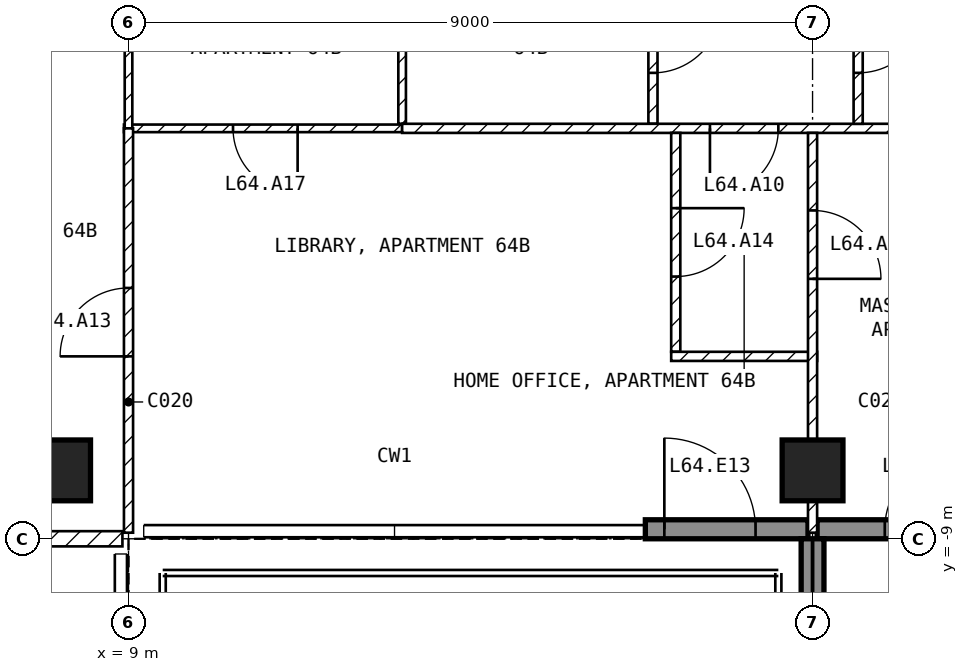
"""IFC4 building model, lengths in metres.
Left out: names, types, materials, properties, quantities, classifications, styles, units other than length and angle.
Written with IfcOpenShell. Run it as: python <this file> out.ifc"""

import sys

from ifc_helpers import new_model, si_unit, direction, frame, frame_2d, origin, origin_2d, place, context, subcontext, project, spatial, rectangle, extrude, element, fill, save


model = new_model("IFC4")
c1 = context("Model", 3, precision=1e-05, world=origin(), true_north=direction((0.0, 1.0)))
c2 = subcontext(c1, "Body", "Model", "MODEL_VIEW")
j1 = project(units=[si_unit("LENGTHUNIT", "METRE"), si_unit("PLANEANGLEUNIT", "RADIAN")], contexts=[c1])
p1 = place(None, origin())
s1 = spatial("IfcSite", under=j1, at=p1, CompositionType="ELEMENT")
p2 = place(p1, origin())
s2 = spatial("IfcBuilding", under=s1, at=p2, CompositionType="ELEMENT")
p3 = place(p2, frame((0.0, 0.0, 253.5)))
s3 = spatial("IfcBuildingStorey", under=s2, at=p3, CompositionType="ELEMENT", Elevation=253.5)
for number, where, z_axis, x_axis in (
    (1, (8.1, -8.1, -0.25), (0.0, 0.0, 1.0), (1.0, 0.0, 0.0)),
    (2, (18.0, -8.1, -0.25), (0.0, 0.0, 1.0), (1.0, 0.0, 0.0)),
):
    element("IfcColumn", number, at=place(p3, frame(where, z_axis=z_axis, x_axis=x_axis)), inside=s3, PredefinedType="COLUMN", context=c2, shape_type="SweptSolid", body=[
        extrude(rectangle(XDim=0.8, YDim=0.8, at=origin_2d()), origin(), (0.0, 0.0, 1.0), 3.5),
    ])
p4 = place(p3, frame((15.8, -8.875, 0.0), z_axis=(0.0, 0.0, 1.0), x_axis=(1.0, 0.0, 0.0)))
e3 = element("IfcWall", 3, at=p4, inside=s3, PredefinedType="SOLIDWALL", context=c2, shape_type="SweptSolid", body=[
    extrude(rectangle(XDim=2.14, YDim=0.25, at=frame_2d((1.07, 0.0))), origin(), (0.0, 0.0, 1.0), 3.25),
])
p5 = place(p4, frame((0.25, 0.0, 0.0)))
e4 = element("IfcOpeningElement", 4, at=p5, cuts=e3, PredefinedType="OPENING", context=c2, shape_type="SweptSolid", body=[
    extrude(rectangle(XDim=1.2, YDim=2.4, at=frame_2d((0.6, 1.2))), frame((0.0, 0.135, 0.0), z_axis=(0.0, -1.0, 0.0), x_axis=(1.0, 0.0, 0.0)), (0.0, 0.0, 1.0), 0.27),
])
p6 = place(p3, frame((18.06, -8.875, 0.0), z_axis=(0.0, 0.0, 1.0), x_axis=(1.0, 0.0, 0.0)))
e5 = element("IfcWall", 5, at=p6, inside=s3, PredefinedType="SOLIDWALL", context=c2, shape_type="SweptSolid", body=[
    extrude(rectangle(XDim=3.04, YDim=0.25, at=frame_2d((1.52, 0.0))), origin(), (0.0, 0.0, 1.0), 3.25),
])
p7 = place(p6, frame((0.89, 0.0, 0.0)))
e6 = element("IfcOpeningElement", 6, at=p7, cuts=e5, PredefinedType="OPENING", context=c2, shape_type="SweptSolid", body=[
    extrude(rectangle(XDim=1.0, YDim=2.4, at=frame_2d((0.5, 1.2))), frame((0.0, 0.135, 0.0), z_axis=(0.0, -1.0, 0.0), x_axis=(1.0, 0.0, 0.0)), (0.0, 0.0, 1.0), 0.27),
])
p8 = place(p3, frame((18.0, -9.0, 0.0), z_axis=(0.0, 0.0, 1.0), x_axis=(0.0, -1.0, 0.0)))
e7 = element("IfcWall", 7, at=p8, inside=s3, PredefinedType="SOLIDWALL", context=c2, shape_type="SweptSolid", body=[
    extrude(rectangle(XDim=2.74, YDim=0.3, at=frame_2d((1.37, 0.0))), origin(), (0.0, 0.0, 1.0), 3.25),
])
p9 = place(p3, frame((8.92, -9.0, 0.0), z_axis=(0.0, 0.0, 1.0), x_axis=(-1.0, 0.0, 0.0)))
e8 = element("IfcWall", 8, at=p9, inside=s3, PredefinedType="PARTITIONING", context=c2, shape_type="SweptSolid", body=[
    extrude(rectangle(XDim=17.84, YDim=0.2, at=frame_2d((8.92, 0.0))), origin(), (0.0, 0.0, 1.0), 3.25),
])
p10 = place(p9, frame((8.42, 0.0, 0.0)))
e9 = element("IfcOpeningElement", 9, at=p10, cuts=e8, PredefinedType="OPENING", context=c2, shape_type="SweptSolid", body=[
    extrude(rectangle(XDim=1.0, YDim=2.1, at=frame_2d((0.5, 1.05))), frame((0.0, 0.11, 0.0), z_axis=(0.0, -1.0, 0.0), x_axis=(1.0, 0.0, 0.0)), (0.0, 0.0, 1.0), 0.22),
])
p11 = place(p3, frame((12.6, -1.3, 0.0), z_axis=(0.0, 0.0, 1.0), x_axis=(0.0, -1.0, 0.0)))
e10 = element("IfcWall", 10, at=p11, inside=s3, PredefinedType="PARTITIONING", context=c2, shape_type="SweptSolid", body=[
    extrude(rectangle(XDim=2.24, YDim=0.1, at=frame_2d((1.12, 0.0))), origin(), (0.0, 0.0, 1.0), 3.25),
])
p12 = place(p3, frame((12.6, -3.6, 0.0), z_axis=(0.0, 0.0, 1.0), x_axis=(-1.0, 0.0, 0.0)))
e11 = element("IfcWall", 11, at=p12, inside=s3, PredefinedType="PARTITIONING", context=c2, shape_type="SweptSolid", body=[
    extrude(rectangle(XDim=3.66, YDim=0.1, at=frame_2d((1.83, 0.0))), origin(), (0.0, 0.0, 1.0), 3.25),
])
p13 = place(p12, frame((1.375, 0.0, 0.0)))
e12 = element("IfcOpeningElement", 12, at=p13, cuts=e11, PredefinedType="OPENING", context=c2, shape_type="SweptSolid", body=[
    extrude(rectangle(XDim=0.85, YDim=2.1, at=frame_2d((0.425, 1.05))), frame((0.0, 0.06, 0.0), z_axis=(0.0, -1.0, 0.0), x_axis=(1.0, 0.0, 0.0)), (0.0, 0.0, 1.0), 0.12),
])
p14 = place(p3, frame((9.0, -3.6, 0.0), z_axis=(0.0, 0.0, 1.0), x_axis=(0.0, 1.0, 0.0)))
e13 = element("IfcWall", 13, at=p14, inside=s3, PredefinedType="PARTITIONING", context=c2, shape_type="SweptSolid", body=[
    extrude(rectangle(XDim=2.3, YDim=0.1, at=frame_2d((1.15, 0.0))), origin(), (0.0, 0.0, 1.0), 3.25),
])
p15 = place(p3, frame((15.9, -1.3, 0.0), z_axis=(0.0, 0.0, 1.0), x_axis=(0.0, -1.0, 0.0)))
e14 = element("IfcWall", 14, at=p15, inside=s3, PredefinedType="PARTITIONING", context=c2, shape_type="SweptSolid", body=[
    extrude(rectangle(XDim=2.24, YDim=0.12, at=frame_2d((1.12, 0.0))), origin(), (0.0, 0.0, 1.0), 3.25),
])
p16 = place(p15, frame((0.67, 0.0, 0.0)))
e15 = element("IfcOpeningElement", 15, at=p16, cuts=e14, PredefinedType="OPENING", context=c2, shape_type="SweptSolid", body=[
    extrude(rectangle(XDim=0.9, YDim=2.1, at=frame_2d((0.45, 1.05))), frame((0.0, 0.07, 0.0), z_axis=(0.0, -1.0, 0.0), x_axis=(1.0, 0.0, 0.0)), (0.0, 0.0, 1.0), 0.14),
])
p17 = place(p3, frame((21.6, -3.6, 0.0), z_axis=(0.0, 0.0, 1.0), x_axis=(-1.0, 0.0, 0.0)))
e16 = element("IfcWall", 16, at=p17, inside=s3, PredefinedType="PARTITIONING", context=c2, shape_type="SweptSolid", body=[
    extrude(rectangle(XDim=9.0, YDim=0.12, at=frame_2d((4.5, 0.0))), origin(), (0.0, 0.0, 1.0), 3.25),
])
p18 = place(p17, frame((4.05, 0.0, 0.0)))
e17 = element("IfcOpeningElement", 17, at=p18, cuts=e16, PredefinedType="OPENING", context=c2, shape_type="SweptSolid", body=[
    extrude(rectangle(XDim=0.9, YDim=2.1, at=frame_2d((0.45, 1.05))), frame((0.0, 0.07, 0.0), z_axis=(0.0, -1.0, 0.0), x_axis=(1.0, 0.0, 0.0)), (0.0, 0.0, 1.0), 0.14),
])
p19 = place(p3, frame((18.6, -1.3, 0.0), z_axis=(0.0, 0.0, 1.0), x_axis=(0.0, -1.0, 0.0)))
e18 = element("IfcWall", 18, at=p19, inside=s3, PredefinedType="PARTITIONING", context=c2, shape_type="SweptSolid", body=[
    extrude(rectangle(XDim=2.24, YDim=0.12, at=frame_2d((1.12, 0.0))), origin(), (0.0, 0.0, 1.0), 3.25),
])
p20 = place(p19, frame((0.67, 0.0, 0.0)))
e19 = element("IfcOpeningElement", 19, at=p20, cuts=e18, PredefinedType="OPENING", context=c2, shape_type="SweptSolid", body=[
    extrude(rectangle(XDim=0.9, YDim=2.1, at=frame_2d((0.45, 1.05))), frame((0.0, 0.07, 0.0), z_axis=(0.0, -1.0, 0.0), x_axis=(1.0, 0.0, 0.0)), (0.0, 0.0, 1.0), 0.14),
])
p21 = place(p3, frame((16.2, -3.66, 0.0), z_axis=(0.0, 0.0, 1.0), x_axis=(0.0, -1.0, 0.0)))
e20 = element("IfcWall", 20, at=p21, inside=s3, PredefinedType="PARTITIONING", context=c2, shape_type="SweptSolid", body=[
    extrude(rectangle(XDim=2.88, YDim=0.12, at=frame_2d((1.44, 0.0))), origin(), (0.0, 0.0, 1.0), 3.25),
])
p22 = place(p21, frame((0.99, 0.0, 0.0)))
e21 = element("IfcOpeningElement", 21, at=p22, cuts=e20, PredefinedType="OPENING", context=c2, shape_type="SweptSolid", body=[
    extrude(rectangle(XDim=0.9, YDim=2.1, at=frame_2d((0.45, 1.05))), frame((0.0, 0.07, 0.0), z_axis=(0.0, -1.0, 0.0), x_axis=(1.0, 0.0, 0.0)), (0.0, 0.0, 1.0), 0.14),
])
p23 = place(p3, frame((16.14, -6.6, 0.0), z_axis=(0.0, 0.0, 1.0), x_axis=(1.0, 0.0, 0.0)))
e22 = element("IfcWall", 22, at=p23, inside=s3, PredefinedType="PARTITIONING", context=c2, shape_type="SweptSolid", body=[
    extrude(rectangle(XDim=1.92, YDim=0.12, at=frame_2d((0.96, 0.0))), origin(), (0.0, 0.0, 1.0), 3.25),
])
p24 = place(p3, frame((18.0, -3.66, 0.0), z_axis=(0.0, 0.0, 1.0), x_axis=(0.0, -1.0, 0.0)))
e23 = element("IfcWall", 23, at=p24, inside=s3, PredefinedType="PARTITIONING", context=c2, shape_type="SweptSolid", body=[
    extrude(rectangle(XDim=5.26, YDim=0.12, at=frame_2d((2.63, 0.0))), origin(), (0.0, 0.0, 1.0), 2.496),
])
p25 = place(p24, frame((1.02, 0.0, 0.0)))
e24 = element("IfcOpeningElement", 24, at=p25, cuts=e23, PredefinedType="OPENING", context=c2, shape_type="SweptSolid", body=[
    extrude(rectangle(XDim=0.9, YDim=2.1, at=frame_2d((0.45, 1.05))), frame((0.0, 0.07, 0.0), z_axis=(0.0, -1.0, 0.0), x_axis=(1.0, 0.0, 0.0)), (0.0, 0.0, 1.0), 0.14),
])
p26 = place(p3, frame((9.0, -8.92, 0.0), z_axis=(0.0, 0.0, 1.0), x_axis=(0.0, 1.0, 0.0)))
e25 = element("IfcWall", 25, at=p26, inside=s3, PredefinedType="PARTITIONING", context=c2, shape_type="SweptSolid", body=[
    extrude(rectangle(XDim=5.32, YDim=0.12, at=frame_2d((2.66, 0.0))), origin(), (0.0, 0.0, 1.0), 3.25),
])
p27 = place(p26, frame((2.32, 0.0, 0.0)))
e26 = element("IfcOpeningElement", 26, at=p27, cuts=e25, PredefinedType="OPENING", context=c2, shape_type="SweptSolid", body=[
    extrude(rectangle(XDim=0.9, YDim=2.1, at=frame_2d((0.45, 1.05))), frame((0.0, 0.07, 0.0), z_axis=(0.0, -1.0, 0.0), x_axis=(1.0, 0.0, 0.0)), (0.0, 0.0, 1.0), 0.14),
])
p28 = place(p5, origin())
e27 = element("IfcDoor", 27, at=p28, inside=s3, OperationType="SINGLE_SWING_LEFT", PredefinedType="DOOR", context=c2, shape_type="SweptSolid", body=[
    extrude(rectangle(XDim=1.2, YDim=2.4, at=frame_2d((0.6, 1.2))), frame((0.0, 0.025, 0.0), z_axis=(0.0, -1.0, 0.0), x_axis=(1.0, 0.0, 0.0)), (0.0, 0.0, 1.0), 0.05),
])
fill(e4, e27)
p29 = place(p7, origin())
e28 = element("IfcDoor", 28, at=p29, inside=s3, OperationType="SINGLE_SWING_RIGHT", PredefinedType="DOOR", context=c2, shape_type="SweptSolid", body=[
    extrude(rectangle(XDim=1.0, YDim=2.4, at=frame_2d((0.5, 1.2))), frame((0.0, 0.025, 0.0), z_axis=(0.0, -1.0, 0.0), x_axis=(1.0, 0.0, 0.0)), (0.0, 0.0, 1.0), 0.05),
])
fill(e6, e28)
p30 = place(p18, origin())
e29 = element("IfcDoor", 29, at=p30, inside=s3, OperationType="SINGLE_SWING_RIGHT", PredefinedType="DOOR", context=c2, shape_type="SweptSolid", body=[
    extrude(rectangle(XDim=0.9, YDim=2.1, at=frame_2d((0.45, 1.05))), frame((0.0, 0.025, 0.0), z_axis=(0.0, -1.0, 0.0), x_axis=(1.0, 0.0, 0.0)), (0.0, 0.0, 1.0), 0.05),
])
fill(e17, e29)
p31 = place(p20, origin())
e30 = element("IfcDoor", 30, at=p31, inside=s3, OperationType="SINGLE_SWING_LEFT", PredefinedType="DOOR", context=c2, shape_type="SweptSolid", body=[
    extrude(rectangle(XDim=0.9, YDim=2.1, at=frame_2d((0.45, 1.05))), frame((0.0, 0.025, 0.0), z_axis=(0.0, -1.0, 0.0), x_axis=(1.0, 0.0, 0.0)), (0.0, 0.0, 1.0), 0.05),
])
fill(e19, e30)
p32 = place(p16, origin())
e31 = element("IfcDoor", 31, at=p32, inside=s3, OperationType="SINGLE_SWING_LEFT", PredefinedType="DOOR", context=c2, shape_type="SweptSolid", body=[
    extrude(rectangle(XDim=0.9, YDim=2.1, at=frame_2d((0.45, 1.05))), frame((0.0, 0.025, 0.0), z_axis=(0.0, -1.0, 0.0), x_axis=(1.0, 0.0, 0.0)), (0.0, 0.0, 1.0), 0.05),
])
fill(e15, e31)
p33 = place(p27, origin())
e32 = element("IfcDoor", 32, at=p33, inside=s3, OperationType="SINGLE_SWING_LEFT", PredefinedType="DOOR", context=c2, shape_type="SweptSolid", body=[
    extrude(rectangle(XDim=0.9, YDim=2.1, at=frame_2d((0.45, 1.05))), frame((0.0, 0.025, 0.0), z_axis=(0.0, -1.0, 0.0), x_axis=(1.0, 0.0, 0.0)), (0.0, 0.0, 1.0), 0.05),
])
fill(e26, e32)
p34 = place(p22, origin())
e33 = element("IfcDoor", 33, at=p34, inside=s3, OperationType="SINGLE_SWING_LEFT", PredefinedType="DOOR", context=c2, shape_type="SweptSolid", body=[
    extrude(rectangle(XDim=0.9, YDim=2.1, at=frame_2d((0.45, 1.05))), frame((0.0, 0.025, 0.0), z_axis=(0.0, -1.0, 0.0), x_axis=(1.0, 0.0, 0.0)), (0.0, 0.0, 1.0), 0.05),
])
fill(e21, e33)
p35 = place(p25, origin())
e34 = element("IfcDoor", 34, at=p35, inside=s3, OperationType="SINGLE_SWING_RIGHT", PredefinedType="DOOR", context=c2, shape_type="SweptSolid", body=[
    extrude(rectangle(XDim=0.9, YDim=2.1, at=frame_2d((0.45, 1.05))), frame((0.0, 0.025, 0.0), z_axis=(0.0, -1.0, 0.0), x_axis=(1.0, 0.0, 0.0)), (0.0, 0.0, 1.0), 0.05),
])
fill(e24, e34)
p36 = place(p13, origin())
e35 = element("IfcDoor", 35, at=p36, inside=s3, OperationType="SINGLE_SWING_LEFT", PredefinedType="DOOR", context=c2, shape_type="SweptSolid", body=[
    extrude(rectangle(XDim=0.85, YDim=2.1, at=frame_2d((0.425, 1.05))), frame((0.0, 0.025, 0.0), z_axis=(0.0, -1.0, 0.0), x_axis=(1.0, 0.0, 0.0)), (0.0, 0.0, 1.0), 0.05),
])
fill(e12, e35)
save(model, sys.argv[1])
